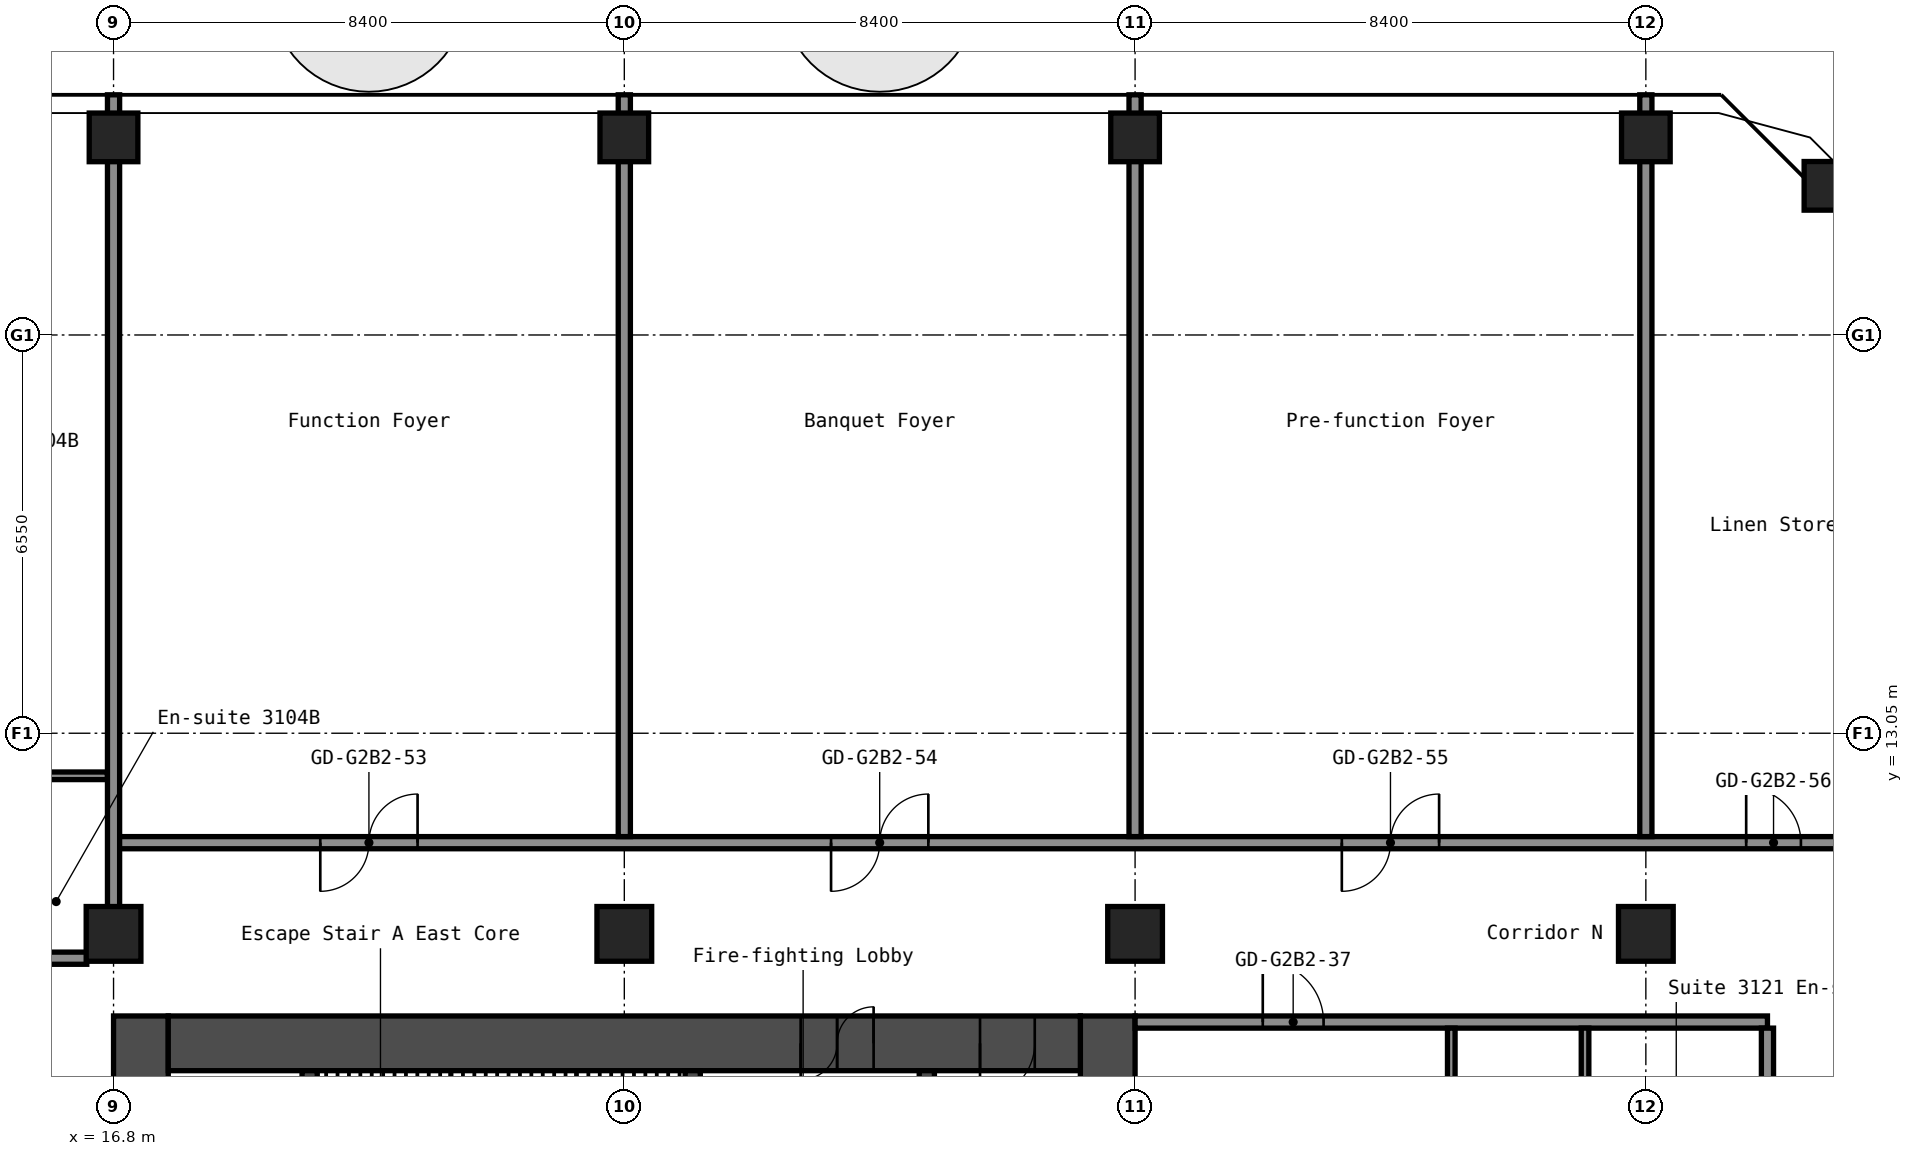
"""IFC4 building model, lengths in metres.
Left out: names, types, materials, properties, quantities, classifications, styles, units other than length and angle.
Written with IfcOpenShell. Run it as: python <this file> out.ifc"""

import sys

from ifc_helpers import new_model, si_unit, direction, frame, frame_2d, origin, origin_2d, place, context, subcontext, project, spatial, rectangle, hollow_rectangle, extrude, element, fill, save


model = new_model("IFC4")
c1 = context("Model", 3, precision=1e-05, world=origin(), true_north=direction((0.0, 1.0)))
c2 = subcontext(c1, "Body", "Model", "MODEL_VIEW")
j1 = project(units=[si_unit("LENGTHUNIT", "METRE"), si_unit("PLANEANGLEUNIT", "RADIAN")], contexts=[c1])
p1 = place(None, origin())
s1 = spatial("IfcSite", under=j1, at=p1, CompositionType="ELEMENT")
p2 = place(p1, origin())
s2 = spatial("IfcBuilding", under=s1, at=p2, CompositionType="ELEMENT")
p3 = place(p2, frame((0.0, 0.0, 110.6)))
s3 = spatial("IfcBuildingStorey", under=s2, at=p3, CompositionType="ELEMENT", Elevation=110.6)
p4 = place(p3, frame((16.8, 9.75, 0.0), z_axis=(0.0, 0.0, 1.0), x_axis=(1.0, 0.0, 0.0)))
e1 = element("IfcColumn", 1, at=p4, inside=s3, PredefinedType="COLUMN", context=c2, shape_type="SweptSolid", body=[
    extrude(hollow_rectangle(XDim=0.9, YDim=0.9, WallThickness=0.036, at=origin_2d()), origin(), (0.0, 0.0, 1.0), 2.8),
])
p5 = place(p3, frame((16.8, 22.85, 0.0), z_axis=(0.0, 0.0, 1.0), x_axis=(1.0, 0.0, 0.0)))
e2 = element("IfcColumn", 2, at=p5, inside=s3, PredefinedType="COLUMN", context=c2, shape_type="SweptSolid", body=[
    extrude(hollow_rectangle(XDim=0.8, YDim=0.8, WallThickness=0.032, at=origin_2d()), origin(), (0.0, 0.0, 1.0), 2.8),
])
p6 = place(p3, frame((25.2, 9.75, 0.0), z_axis=(0.0, 0.0, 1.0), x_axis=(1.0, 0.0, 0.0)))
e3 = element("IfcColumn", 3, at=p6, inside=s3, PredefinedType="COLUMN", context=c2, shape_type="SweptSolid", body=[
    extrude(hollow_rectangle(XDim=0.9, YDim=0.9, WallThickness=0.036, at=origin_2d()), origin(), (0.0, 0.0, 1.0), 2.8),
])
p7 = place(p3, frame((25.2, 22.85, 0.0), z_axis=(0.0, 0.0, 1.0), x_axis=(1.0, 0.0, 0.0)))
e4 = element("IfcColumn", 4, at=p7, inside=s3, PredefinedType="COLUMN", context=c2, shape_type="SweptSolid", body=[
    extrude(hollow_rectangle(XDim=0.8, YDim=0.8, WallThickness=0.032, at=origin_2d()), origin(), (0.0, 0.0, 1.0), 2.8),
])
p8 = place(p3, frame((33.6, 9.75, 0.0), z_axis=(0.0, 0.0, 1.0), x_axis=(1.0, 0.0, 0.0)))
e5 = element("IfcColumn", 5, at=p8, inside=s3, PredefinedType="COLUMN", context=c2, shape_type="SweptSolid", body=[
    extrude(hollow_rectangle(XDim=0.9, YDim=0.9, WallThickness=0.036, at=origin_2d()), origin(), (0.0, 0.0, 1.0), 2.8),
])
p9 = place(p3, frame((33.6, 22.85, 0.0), z_axis=(0.0, 0.0, 1.0), x_axis=(1.0, 0.0, 0.0)))
e6 = element("IfcColumn", 6, at=p9, inside=s3, PredefinedType="COLUMN", context=c2, shape_type="SweptSolid", body=[
    extrude(hollow_rectangle(XDim=0.8, YDim=0.8, WallThickness=0.032, at=origin_2d()), origin(), (0.0, 0.0, 1.0), 2.8),
])
p10 = place(p3, frame((42.0, 9.75, 0.0), z_axis=(0.0, 0.0, 1.0), x_axis=(1.0, 0.0, 0.0)))
e7 = element("IfcColumn", 7, at=p10, inside=s3, PredefinedType="COLUMN", context=c2, shape_type="SweptSolid", body=[
    extrude(hollow_rectangle(XDim=0.9, YDim=0.9, WallThickness=0.036, at=origin_2d()), origin(), (0.0, 0.0, 1.0), 2.8),
])
for number, where, z_axis, x_axis in (
    (8, (42.0, 22.85, 0.0), (0.0, 0.0, 1.0), (1.0, 0.0, 0.0)),
    (9, (45.003, 22.053, 0.0), (0.0, 0.0, 1.0), (1.0, 0.0, 0.0)),
):
    element("IfcColumn", number, at=place(p3, frame(where, z_axis=z_axis, x_axis=x_axis)), inside=s3, PredefinedType="COLUMN", context=c2, shape_type="SweptSolid", body=[
        extrude(hollow_rectangle(XDim=0.8, YDim=0.8, WallThickness=0.032, at=origin_2d()), origin(), (0.0, 0.0, 1.0), 2.8),
    ])
p11 = place(p3, frame((17.25, -8.4, 0.0), z_axis=(0.0, 0.0, 1.0), x_axis=(0.0, 1.0, 0.0)))
e10 = element("IfcWall", 10, at=p11, inside=s3, PredefinedType="SHEAR", context=c2, shape_type="SweptSolid", body=[
    extrude(rectangle(XDim=16.8, YDim=0.9, at=frame_2d((8.4, 0.0))), origin(), (0.0, 0.0, 1.0), 2.8),
])
p12 = place(p11, frame((7.6, 0.0, 0.0)))
e11 = element("IfcOpeningElement", 11, at=p12, cuts=e10, PredefinedType="OPENING", context=c2, shape_type="SweptSolid", body=[
    extrude(rectangle(XDim=1.2, YDim=2.1, at=frame_2d((0.6, 1.05))), frame((0.0, 0.46, 0.0), z_axis=(0.0, -1.0, 0.0), x_axis=(1.0, 0.0, 0.0)), (0.0, 0.0, 1.0), 0.92),
])
p13 = place(p3, frame((33.15, -8.4, 0.0), z_axis=(0.0, 0.0, 1.0), x_axis=(0.0, 1.0, 0.0)))
e12 = element("IfcWall", 12, at=p13, inside=s3, PredefinedType="SHEAR", context=c2, shape_type="SweptSolid", body=[
    extrude(rectangle(XDim=16.8, YDim=0.9, at=frame_2d((8.4, 0.0))), origin(), (0.0, 0.0, 1.0), 2.8),
])
p14 = place(p3, frame((17.7, 7.95, 0.0), z_axis=(0.0, 0.0, 1.0), x_axis=(1.0, 0.0, 0.0)))
e13 = element("IfcWall", 13, at=p14, inside=s3, PredefinedType="SHEAR", context=c2, shape_type="SweptSolid", body=[
    extrude(rectangle(XDim=15.0, YDim=0.9, at=frame_2d((7.5, 0.0))), origin(), (0.0, 0.0, 1.0), 2.8),
])
p15 = place(p14, frame((10.4, 0.0, 0.0)))
e14 = element("IfcOpeningElement", 14, at=p15, cuts=e13, PredefinedType="OPENING", context=c2, shape_type="SweptSolid", body=[
    extrude(rectangle(XDim=1.2, YDim=2.1, at=frame_2d((0.6, 1.05))), frame((0.0, 0.46, 0.0), z_axis=(0.0, -1.0, 0.0), x_axis=(1.0, 0.0, 0.0)), (0.0, 0.0, 1.0), 0.92),
])
p16 = place(p14, frame((13.35, 0.0, 0.0)))
e15 = element("IfcOpeningElement", 15, at=p16, cuts=e13, PredefinedType="OPENING", context=c2, shape_type="SweptSolid", body=[
    extrude(rectangle(XDim=0.9, YDim=2.1, at=frame_2d((0.45, 1.05))), frame((0.0, 0.46, 0.0), z_axis=(0.0, -1.0, 0.0), x_axis=(1.0, 0.0, 0.0)), (0.0, 0.0, 1.0), 0.92),
])
p17 = place(p3, frame((20.025, 1.2, 0.0), z_axis=(0.0, 0.0, 1.0), x_axis=(0.0, 1.0, 0.0)))
e16 = element("IfcWall", 16, at=p17, inside=s3, PredefinedType="SHEAR", context=c2, shape_type="SweptSolid", body=[
    extrude(rectangle(XDim=6.3, YDim=0.25, at=frame_2d((3.15, 0.0))), origin(), (0.0, 0.0, 1.0), 2.8),
])
p18 = place(p3, frame((26.325, 3.75, 0.0), z_axis=(0.0, 0.0, 1.0), x_axis=(0.0, 1.0, 0.0)))
e17 = element("IfcWall", 17, at=p18, inside=s3, PredefinedType="SHEAR", context=c2, shape_type="SweptSolid", body=[
    extrude(rectangle(XDim=3.75, YDim=0.25, at=frame_2d((1.875, 0.0))), origin(), (0.0, 0.0, 1.0), 2.8),
])
p19 = place(p18, frame((1.25, 0.0, 0.0)))
e18 = element("IfcOpeningElement", 18, at=p19, cuts=e17, PredefinedType="OPENING", context=c2, shape_type="SweptSolid", body=[
    extrude(rectangle(XDim=1.2, YDim=2.1, at=frame_2d((0.6, 1.05))), frame((0.0, 0.135, 0.0), z_axis=(0.0, -1.0, 0.0), x_axis=(1.0, 0.0, 0.0)), (0.0, 0.0, 1.0), 0.27),
])
p20 = place(p3, frame((30.175, 1.45, 0.0), z_axis=(0.0, 0.0, 1.0), x_axis=(0.0, 1.0, 0.0)))
e19 = element("IfcWall", 19, at=p20, inside=s3, PredefinedType="SHEAR", context=c2, shape_type="SweptSolid", body=[
    extrude(rectangle(XDim=6.05, YDim=0.25, at=frame_2d((3.025, 0.0))), origin(), (0.0, 0.0, 1.0), 2.8),
])
p21 = place(p20, frame((2.625, 0.0, 0.0)))
e20 = element("IfcOpeningElement", 20, at=p21, cuts=e19, PredefinedType="OPENING", context=c2, shape_type="SweptSolid", body=[
    extrude(rectangle(XDim=1.1, YDim=2.1, at=frame_2d((0.55, 1.05))), frame((0.0, 0.135, 0.0), z_axis=(0.0, -1.0, 0.0), x_axis=(1.0, 0.0, 0.0)), (0.0, 0.0, 1.0), 0.27),
])
p22 = place(p3, frame((33.6, 8.3, 0.0), z_axis=(0.0, 0.0, 1.0), x_axis=(1.0, 0.0, 0.0)))
e21 = element("IfcWall", 21, at=p22, inside=s3, PredefinedType="PARTITIONING", context=c2, shape_type="SweptSolid", body=[
    extrude(rectangle(XDim=10.4, YDim=0.2, at=frame_2d((5.2, 0.0))), origin(), (0.0, 0.0, 1.0), 2.8),
])
p23 = place(p22, frame((2.1, 0.0, 0.0)))
e22 = element("IfcOpeningElement", 22, at=p23, cuts=e21, PredefinedType="OPENING", context=c2, shape_type="SweptSolid", body=[
    extrude(rectangle(XDim=1.0, YDim=2.1, at=frame_2d((0.5, 1.05))), frame((0.0, 0.11, 0.0), z_axis=(0.0, -1.0, 0.0), x_axis=(1.0, 0.0, 0.0)), (0.0, 0.0, 1.0), 0.22),
])
p24 = place(p3, frame((-16.36, 9.35, 0.0), z_axis=(0.0, 0.0, 1.0), x_axis=(1.0, 0.0, 0.0)))
e23 = element("IfcWall", 23, at=p24, inside=s3, PredefinedType="PARTITIONING", context=c2, shape_type="SweptSolid", body=[
    extrude(rectangle(XDim=32.72, YDim=0.2, at=frame_2d((16.36, 0.0))), origin(), (0.0, 0.0, 1.0), 2.8),
])
p25 = place(p24, frame((1.545, 0.0, 0.0)))
e24 = element("IfcOpeningElement", 24, at=p25, cuts=e23, PredefinedType="OPENING", context=c2, shape_type="SweptSolid", body=[
    extrude(rectangle(XDim=0.9, YDim=2.1, at=frame_2d((0.45, 1.05))), frame((0.0, 0.11, 0.0), z_axis=(0.0, -1.0, 0.0), x_axis=(1.0, 0.0, 0.0)), (0.0, 0.0, 1.0), 0.22),
])
p26 = place(p24, frame((5.745, 0.0, 0.0)))
e25 = element("IfcOpeningElement", 25, at=p26, cuts=e23, PredefinedType="OPENING", context=c2, shape_type="SweptSolid", body=[
    extrude(rectangle(XDim=0.9, YDim=2.1, at=frame_2d((0.45, 1.05))), frame((0.0, 0.11, 0.0), z_axis=(0.0, -1.0, 0.0), x_axis=(1.0, 0.0, 0.0)), (0.0, 0.0, 1.0), 0.22),
])
p27 = place(p24, frame((9.275, 0.0, 0.0)))
e26 = element("IfcOpeningElement", 26, at=p27, cuts=e23, PredefinedType="OPENING", context=c2, shape_type="SweptSolid", body=[
    extrude(rectangle(XDim=0.9, YDim=2.1, at=frame_2d((0.45, 1.05))), frame((0.0, 0.11, 0.0), z_axis=(0.0, -1.0, 0.0), x_axis=(1.0, 0.0, 0.0)), (0.0, 0.0, 1.0), 0.22),
])
p28 = place(p24, frame((13.475, 0.0, 0.0)))
e27 = element("IfcOpeningElement", 27, at=p28, cuts=e23, PredefinedType="OPENING", context=c2, shape_type="SweptSolid", body=[
    extrude(rectangle(XDim=0.9, YDim=2.1, at=frame_2d((0.45, 1.05))), frame((0.0, 0.11, 0.0), z_axis=(0.0, -1.0, 0.0), x_axis=(1.0, 0.0, 0.0)), (0.0, 0.0, 1.0), 0.22),
])
p29 = place(p24, frame((19.21, 0.0, 0.0)))
e28 = element("IfcOpeningElement", 28, at=p29, cuts=e23, PredefinedType="OPENING", context=c2, shape_type="SweptSolid", body=[
    extrude(rectangle(XDim=1.0, YDim=2.1, at=frame_2d((0.5, 1.05))), frame((0.0, 0.11, 0.0), z_axis=(0.0, -1.0, 0.0), x_axis=(1.0, 0.0, 0.0)), (0.0, 0.0, 1.0), 0.22),
])
p30 = place(p24, frame((20.91, 0.0, 0.0)))
e29 = element("IfcOpeningElement", 29, at=p30, cuts=e23, PredefinedType="OPENING", context=c2, shape_type="SweptSolid", body=[
    extrude(rectangle(XDim=1.0, YDim=2.1, at=frame_2d((0.5, 1.05))), frame((0.0, 0.11, 0.0), z_axis=(0.0, -1.0, 0.0), x_axis=(1.0, 0.0, 0.0)), (0.0, 0.0, 1.0), 0.22),
])
p31 = place(p24, frame((27.61, 0.0, 0.0)))
e30 = element("IfcOpeningElement", 30, at=p31, cuts=e23, PredefinedType="OPENING", context=c2, shape_type="SweptSolid", body=[
    extrude(rectangle(XDim=1.0, YDim=2.1, at=frame_2d((0.5, 1.05))), frame((0.0, 0.11, 0.0), z_axis=(0.0, -1.0, 0.0), x_axis=(1.0, 0.0, 0.0)), (0.0, 0.0, 1.0), 0.22),
])
p32 = place(p24, frame((29.31, 0.0, 0.0)))
e31 = element("IfcOpeningElement", 31, at=p32, cuts=e23, PredefinedType="OPENING", context=c2, shape_type="SweptSolid", body=[
    extrude(rectangle(XDim=1.0, YDim=2.1, at=frame_2d((0.5, 1.05))), frame((0.0, 0.11, 0.0), z_axis=(0.0, -1.0, 0.0), x_axis=(1.0, 0.0, 0.0)), (0.0, 0.0, 1.0), 0.22),
])
p33 = place(p3, frame((16.8, 11.25, 0.0), z_axis=(0.0, 0.0, 1.0), x_axis=(1.0, 0.0, 0.0)))
e32 = element("IfcWall", 32, at=p33, inside=s3, PredefinedType="PARTITIONING", context=c2, shape_type="SweptSolid", body=[
    extrude(rectangle(XDim=29.7, YDim=0.2, at=frame_2d((14.85, 0.0))), origin(), (0.0, 0.0, 1.0), 2.8),
])
p34 = place(p33, frame((3.4, 0.0, 0.0)))
e33 = element("IfcOpeningElement", 33, at=p34, cuts=e32, PredefinedType="OPENING", context=c2, shape_type="SweptSolid", body=[
    extrude(rectangle(XDim=1.6, YDim=2.1, at=frame_2d((0.8, 1.05))), frame((0.0, 0.11, 0.0), z_axis=(0.0, -1.0, 0.0), x_axis=(1.0, 0.0, 0.0)), (0.0, 0.0, 1.0), 0.22),
])
p35 = place(p33, frame((11.8, 0.0, 0.0)))
e34 = element("IfcOpeningElement", 34, at=p35, cuts=e32, PredefinedType="OPENING", context=c2, shape_type="SweptSolid", body=[
    extrude(rectangle(XDim=1.6, YDim=2.1, at=frame_2d((0.8, 1.05))), frame((0.0, 0.11, 0.0), z_axis=(0.0, -1.0, 0.0), x_axis=(1.0, 0.0, 0.0)), (0.0, 0.0, 1.0), 0.22),
])
p36 = place(p33, frame((20.2, 0.0, 0.0)))
e35 = element("IfcOpeningElement", 35, at=p36, cuts=e32, PredefinedType="OPENING", context=c2, shape_type="SweptSolid", body=[
    extrude(rectangle(XDim=1.6, YDim=2.1, at=frame_2d((0.8, 1.05))), frame((0.0, 0.11, 0.0), z_axis=(0.0, -1.0, 0.0), x_axis=(1.0, 0.0, 0.0)), (0.0, 0.0, 1.0), 0.22),
])
p37 = place(p33, frame((26.85, 0.0, 0.0)))
e36 = element("IfcOpeningElement", 36, at=p37, cuts=e32, PredefinedType="OPENING", context=c2, shape_type="SweptSolid", body=[
    extrude(rectangle(XDim=0.9, YDim=2.1, at=frame_2d((0.45, 1.05))), frame((0.0, 0.11, 0.0), z_axis=(0.0, -1.0, 0.0), x_axis=(1.0, 0.0, 0.0)), (0.0, 0.0, 1.0), 0.22),
])
p38 = place(p3, frame((14.363, 12.35, 0.0), z_axis=(0.0, 0.0, 1.0), x_axis=(1.0, 0.0, 0.0)))
e37 = element("IfcWall", 37, at=p38, inside=s3, PredefinedType="PARTITIONING", context=c2, shape_type="SweptSolid", body=[
    extrude(rectangle(XDim=2.337, YDim=0.125, at=frame_2d((1.169, 0.0))), origin(), (0.0, 0.0, 1.0), 2.8),
])
p39 = place(p3, frame((16.8, 10.19, 0.0), z_axis=(0.0, 0.0, 1.0), x_axis=(0.0, 1.0, 0.0)))
e38 = element("IfcWall", 38, at=p39, inside=s3, PredefinedType="PARTITIONING", context=c2, shape_type="SweptSolid", body=[
    extrude(rectangle(XDim=13.36, YDim=0.2, at=frame_2d((6.68, 0.0))), origin(), (0.0, 0.0, 1.0), 2.8),
])
for number, where, z_axis, x_axis in (
    (39, (25.2, 11.35, 0.0), (0.0, 0.0, 1.0), (0.0, 1.0, 0.0)),
    (40, (33.6, 11.35, 0.0), (0.0, 0.0, 1.0), (0.0, 1.0, 0.0)),
):
    element("IfcWall", number, at=place(p3, frame(where, z_axis=z_axis, x_axis=x_axis)), inside=s3, PredefinedType="PARTITIONING", context=c2, shape_type="SweptSolid", body=[
        extrude(rectangle(XDim=12.2, YDim=0.2, at=frame_2d((6.1, 0.0))), origin(), (0.0, 0.0, 1.0), 2.8),
    ])
p40 = place(p3, frame((38.8, 0.1, 0.0), z_axis=(0.0, 0.0, 1.0), x_axis=(0.0, 1.0, 0.0)))
e41 = element("IfcWall", 41, at=p40, inside=s3, PredefinedType="PARTITIONING", context=c2, shape_type="SweptSolid", body=[
    extrude(rectangle(XDim=8.1, YDim=0.125, at=frame_2d((4.05, 0.0))), origin(), (0.0, 0.0, 1.0), 2.8),
])
p41 = place(p40, frame((3.15, 0.0, 0.0)))
e42 = element("IfcOpeningElement", 42, at=p41, cuts=e41, PredefinedType="OPENING", context=c2, shape_type="SweptSolid", body=[
    extrude(rectangle(XDim=0.9, YDim=2.1, at=frame_2d((0.45, 1.05))), frame((0.0, 0.073, 0.0), z_axis=(0.0, -1.0, 0.0), x_axis=(1.0, 0.0, 0.0)), (0.0, 0.0, 1.0), 0.145),
])
p42 = place(p3, frame((41.0, 5.1, 0.0), z_axis=(0.0, 0.0, 1.0), x_axis=(0.0, 1.0, 0.0)))
e43 = element("IfcWall", 43, at=p42, inside=s3, PredefinedType="PARTITIONING", context=c2, shape_type="SweptSolid", body=[
    extrude(rectangle(XDim=3.1, YDim=0.125, at=frame_2d((1.55, 0.0))), origin(), (0.0, 0.0, 1.0), 2.8),
])
p43 = place(p3, frame((42.0, 11.35, 0.0), z_axis=(0.0, 0.0, 1.0), x_axis=(0.0, 1.0, 0.0)))
e44 = element("IfcWall", 44, at=p43, inside=s3, PredefinedType="PARTITIONING", context=c2, shape_type="SweptSolid", body=[
    extrude(rectangle(XDim=12.2, YDim=0.2, at=frame_2d((6.1, 0.0))), origin(), (0.0, 0.0, 1.0), 2.8),
])
p44 = place(p3, frame((44.0, -8.2, 0.0), z_axis=(0.0, 0.0, 1.0), x_axis=(0.0, 1.0, 0.0)))
e45 = element("IfcWall", 45, at=p44, inside=s3, PredefinedType="PARTITIONING", context=c2, shape_type="SweptSolid", body=[
    extrude(rectangle(XDim=16.4, YDim=0.2, at=frame_2d((8.2, 0.0))), origin(), (0.0, 0.0, 1.0), 2.8),
])
p45 = place(p15, origin())
e46 = element("IfcDoor", 46, at=p45, inside=s3, OperationType="DOUBLE_DOOR_SINGLE_SWING", PredefinedType="DOOR", context=c2, shape_type="SweptSolid", body=[
    extrude(rectangle(XDim=1.2, YDim=2.1, at=frame_2d((0.6, 1.05))), frame((0.0, 0.025, 0.0), z_axis=(0.0, -1.0, 0.0), x_axis=(1.0, 0.0, 0.0)), (0.0, 0.0, 1.0), 0.05),
])
fill(e14, e46)
p46 = place(p16, origin())
e47 = element("IfcDoor", 47, at=p46, inside=s3, OperationType="SINGLE_SWING_LEFT", PredefinedType="DOOR", context=c2, shape_type="SweptSolid", body=[
    extrude(rectangle(XDim=0.9, YDim=2.1, at=frame_2d((0.45, 1.05))), frame((0.0, 0.025, 0.0), z_axis=(0.0, -1.0, 0.0), x_axis=(1.0, 0.0, 0.0)), (0.0, 0.0, 1.0), 0.05),
])
fill(e15, e47)
p47 = place(p23, origin())
e48 = element("IfcDoor", 48, at=p47, inside=s3, OperationType="SINGLE_SWING_RIGHT", PredefinedType="DOOR", context=c2, shape_type="SweptSolid", body=[
    extrude(rectangle(XDim=1.0, YDim=2.1, at=frame_2d((0.5, 1.05))), frame((0.0, 0.025, 0.0), z_axis=(0.0, -1.0, 0.0), x_axis=(1.0, 0.0, 0.0)), (0.0, 0.0, 1.0), 0.05),
])
fill(e22, e48)
p48 = place(p34, origin())
e49 = element("IfcDoor", 49, at=p48, inside=s3, OperationType="DOUBLE_DOOR_SINGLE_SWING", PredefinedType="DOOR", context=c2, shape_type="SweptSolid", body=[
    extrude(rectangle(XDim=1.6, YDim=2.1, at=frame_2d((0.8, 1.05))), frame((0.0, 0.025, 0.0), z_axis=(0.0, -1.0, 0.0), x_axis=(1.0, 0.0, 0.0)), (0.0, 0.0, 1.0), 0.05),
])
fill(e33, e49)
p49 = place(p35, origin())
e50 = element("IfcDoor", 50, at=p49, inside=s3, OperationType="DOUBLE_DOOR_SINGLE_SWING", PredefinedType="DOOR", context=c2, shape_type="SweptSolid", body=[
    extrude(rectangle(XDim=1.6, YDim=2.1, at=frame_2d((0.8, 1.05))), frame((0.0, 0.025, 0.0), z_axis=(0.0, -1.0, 0.0), x_axis=(1.0, 0.0, 0.0)), (0.0, 0.0, 1.0), 0.05),
])
fill(e34, e50)
p50 = place(p36, origin())
e51 = element("IfcDoor", 51, at=p50, inside=s3, OperationType="DOUBLE_DOOR_SINGLE_SWING", PredefinedType="DOOR", context=c2, shape_type="SweptSolid", body=[
    extrude(rectangle(XDim=1.6, YDim=2.1, at=frame_2d((0.8, 1.05))), frame((0.0, 0.025, 0.0), z_axis=(0.0, -1.0, 0.0), x_axis=(1.0, 0.0, 0.0)), (0.0, 0.0, 1.0), 0.05),
])
fill(e35, e51)
p51 = place(p37, origin())
e52 = element("IfcDoor", 52, at=p51, inside=s3, OperationType="SINGLE_SWING_RIGHT", PredefinedType="DOOR", context=c2, shape_type="SweptSolid", body=[
    extrude(rectangle(XDim=0.9, YDim=2.1, at=frame_2d((0.45, 1.05))), frame((0.0, 0.025, 0.0), z_axis=(0.0, -1.0, 0.0), x_axis=(1.0, 0.0, 0.0)), (0.0, 0.0, 1.0), 0.05),
])
fill(e36, e52)
save(model, sys.argv[1])
